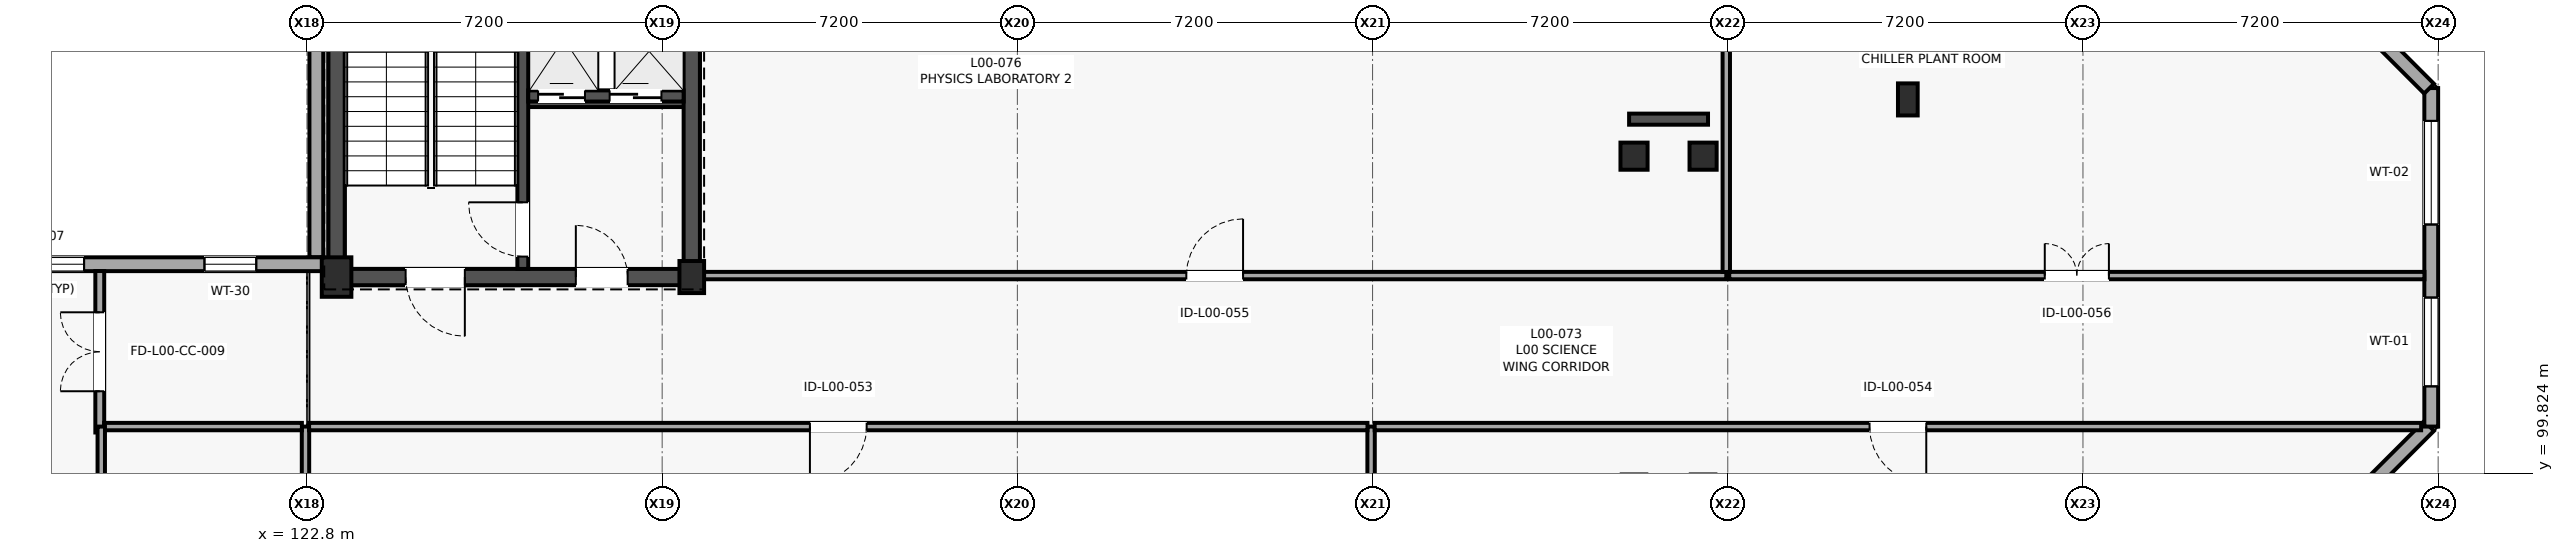
"""IFC4 building model, lengths in metres.
Left out: names, types, materials, properties, quantities, classifications, styles, units other than length and angle.
Written with IfcOpenShell. Run it as: python <this file> out.ifc"""

import sys

from ifc_helpers import new_model, si_unit, direction, frame, frame_2d, origin, origin_2d, place, context, subcontext, project, spatial, rectangle, extrude, element, fill, save


model = new_model("IFC4")
c1 = context("Model", 3, precision=1e-05, world=origin(), true_north=direction((0.0, 1.0)))
c2 = subcontext(c1, "Body", "Model", "MODEL_VIEW")
j1 = project(units=[si_unit("LENGTHUNIT", "METRE"), si_unit("PLANEANGLEUNIT", "RADIAN")], contexts=[c1])
p1 = place(None, origin())
s1 = spatial("IfcSite", under=j1, at=p1, CompositionType="ELEMENT")
p2 = place(p1, origin())
s2 = spatial("IfcBuilding", under=s1, at=p2, CompositionType="ELEMENT")
p3 = place(p2, origin())
s3 = spatial("IfcBuildingStorey", under=s2, at=p3, CompositionType="ELEMENT", Elevation=0.0)
p4 = place(p3, frame((126.955, 107.41, -1.55), z_axis=(0.0, 0.0, 1.0), x_axis=(1.0, 0.0, 0.0)))
e1 = element("IfcWall", 1, at=p4, inside=s3, PredefinedType="SHEAR", context=c2, shape_type="SweptSolid", body=[
    extrude(rectangle(XDim=3.81, YDim=0.33, at=frame_2d((1.905, 0.0))), origin(), (0.0, 0.0, 1.0), 1.3),
])
for number, where, z_axis, x_axis in (
    (2, (127.12, 107.575, -1.55), (0.0, 0.0, 1.0), (0.0, 1.0, 0.0)),
    (3, (130.6, 107.575, -1.55), (0.0, 0.0, 1.0), (0.0, 1.0, 0.0)),
):
    element("IfcWall", number, at=place(p3, frame(where, z_axis=z_axis, x_axis=x_axis)), inside=s3, PredefinedType="SHEAR", context=c2, shape_type="SweptSolid", body=[
        extrude(rectangle(XDim=3.86, YDim=0.33, at=frame_2d((1.93, 0.0))), origin(), (0.0, 0.0, 1.0), 1.3),
    ])
p5 = place(p3, frame((123.4, 103.965, -1.85), z_axis=(0.0, 0.0, 1.0), x_axis=(0.0, 1.0, 0.0)))
e4 = element("IfcWall", 4, at=p5, inside=s3, PredefinedType="SHEAR", context=c2, shape_type="SweptSolid", body=[
    extrude(rectangle(XDim=7.47, YDim=0.33, at=frame_2d((3.735, 0.0))), origin(), (0.0, 0.0, 1.0), 1.6),
])
p6 = place(p3, frame((123.235, 103.8, -1.85), z_axis=(0.0, 0.0, 1.0), x_axis=(1.0, 0.0, 0.0)))
e5 = element("IfcWall", 5, at=p6, inside=s3, PredefinedType="SHEAR", context=c2, shape_type="SweptSolid", body=[
    extrude(rectangle(XDim=3.865, YDim=0.33, at=frame_2d((1.933, 0.0))), origin(), (0.0, 0.0, 1.0), 1.6),
])
p7 = place(p3, frame((123.4, 103.8, 0.0), z_axis=(0.0, 0.0, 1.0), x_axis=(1.0, 0.0, 0.0)))
e6 = element("IfcColumn", 6, at=p7, inside=s3, PredefinedType="COLUMN", context=c2, shape_type="SweptSolid", body=[
    extrude(rectangle(XDim=0.6, YDim=0.8, at=origin_2d()), origin(), (0.0, 0.0, 1.0), 4.2),
])
p8 = place(p3, frame((130.6, 103.8, 0.0), z_axis=(0.0, 0.0, 1.0), x_axis=(1.0, 0.0, 0.0)))
e7 = element("IfcColumn", 7, at=p8, inside=s3, PredefinedType="COLUMN", context=c2, shape_type="SweptSolid", body=[
    extrude(rectangle(XDim=0.5, YDim=0.65, at=origin_2d()), origin(), (0.0, 0.0, 1.0), 4.2),
])
for number, where, z_axis, x_axis in (
    (8, (149.7, 106.25, 0.0), (0.0, 0.0, 1.0), (1.0, 0.0, 0.0)),
    (9, (151.1, 106.25, 0.0), (0.0, 0.0, 1.0), (1.0, 0.0, 0.0)),
):
    element("IfcColumn", number, at=place(p3, frame(where, z_axis=z_axis, x_axis=x_axis)), inside=s3, PredefinedType="COLUMN", context=c2, shape_type="SweptSolid", body=[
        extrude(rectangle(XDim=0.55, YDim=0.55, at=origin_2d()), origin(), (0.0, 0.0, 1.0), 4.2),
    ])
p9 = place(p3, frame((155.25, 107.4, 0.0), z_axis=(0.0, 0.0, 1.0), x_axis=(1.0, 0.0, 0.0)))
e10 = element("IfcColumn", 10, at=p9, inside=s3, PredefinedType="COLUMN", context=c2, shape_type="SweptSolid", body=[
    extrude(rectangle(XDim=0.4, YDim=0.65, at=origin_2d()), origin(), (0.0, 0.0, 1.0), 4.2),
])
p10 = place(p3, frame((161.618, 96.584, 0.0), z_axis=(0.0, 0.0, 1.0), x_axis=(0.707106781187, 0.707106781187, 0.0)))
e11 = element("IfcWall", 11, at=p10, inside=s3, PredefinedType="SOLIDWALL", context=c2, shape_type="SweptSolid", body=[
    extrude(rectangle(XDim=5.937, YDim=0.28, at=frame_2d((2.968, 0.0))), origin(), (0.0, 0.0, 1.0), 3.98),
])
p11 = place(p3, frame((165.86, 100.77, 0.0), z_axis=(0.0, 0.0, 1.0), x_axis=(0.0, 1.0, 0.0)))
e12 = element("IfcWall", 12, at=p11, inside=s3, PredefinedType="SOLIDWALL", context=c2, shape_type="SweptSolid", body=[
    extrude(rectangle(XDim=6.86, YDim=0.28, at=frame_2d((3.43, 0.0))), origin(), (0.0, 0.0, 1.0), 3.98),
])
p12 = place(p11, frame((0.815, 0.0, 0.85)))
e13 = element("IfcOpeningElement", 13, at=p12, cuts=e12, PredefinedType="OPENING", context=c2, shape_type="SweptSolid", body=[
    extrude(rectangle(XDim=1.8, YDim=1.8, at=frame_2d((0.9, 0.9))), frame((0.0, 0.15, 0.0), z_axis=(0.0, -1.0, 0.0), x_axis=(1.0, 0.0, 0.0)), (0.0, 0.0, 1.0), 0.3),
])
p13 = place(p11, frame((4.095, 0.0, 0.85)))
e14 = element("IfcOpeningElement", 14, at=p13, cuts=e12, PredefinedType="OPENING", context=c2, shape_type="SweptSolid", body=[
    extrude(rectangle(XDim=2.1, YDim=1.8, at=frame_2d((1.05, 0.9))), frame((0.0, 0.15, 0.0), z_axis=(0.0, -1.0, 0.0), x_axis=(1.0, 0.0, 0.0)), (0.0, 0.0, 1.0), 0.3),
])
p14 = place(p3, frame((165.816, 107.618, 0.0), z_axis=(0.0, 0.0, 1.0), x_axis=(-0.707106781187, 0.707106781187, 0.0)))
e15 = element("IfcWall", 15, at=p14, inside=s3, PredefinedType="SOLIDWALL", context=c2, shape_type="SweptSolid", body=[
    extrude(rectangle(XDim=5.937, YDim=0.28, at=frame_2d((2.968, 0.0))), origin(), (0.0, 0.0, 1.0), 3.98),
])
p15 = place(p3, frame((122.99, 111.72, 0.0), z_axis=(0.0, 0.0, 1.0), x_axis=(0.0, -1.0, 0.0)))
e16 = element("IfcWall", 16, at=p15, inside=s3, PredefinedType="SOLIDWALL", context=c2, shape_type="SweptSolid", body=[
    extrude(rectangle(XDim=7.52, YDim=0.28, at=frame_2d((3.76, 0.0))), origin(), (0.0, 0.0, 1.0), 3.98),
])
p16 = place(p3, frame((123.13, 104.06, 0.0), z_axis=(0.0, 0.0, 1.0), x_axis=(-1.0, 0.0, 0.0)))
e17 = element("IfcWall", 17, at=p16, inside=s3, PredefinedType="SOLIDWALL", context=c2, shape_type="SweptSolid", body=[
    extrude(rectangle(XDim=7.53, YDim=0.28, at=frame_2d((3.765, 0.0))), origin(), (0.0, 0.0, 1.0), 3.98),
])
p17 = place(p16, frame((1.358, 0.0, 1.05)))
e18 = element("IfcOpeningElement", 18, at=p17, cuts=e17, PredefinedType="OPENING", context=c2, shape_type="SweptSolid", body=[
    extrude(rectangle(XDim=1.05, YDim=1.3, at=frame_2d((0.525, 0.65))), frame((0.0, 0.15, 0.0), z_axis=(0.0, -1.0, 0.0), x_axis=(1.0, 0.0, 0.0)), (0.0, 0.0, 1.0), 0.3),
])
p18 = place(p16, frame((4.848, 0.0, 1.05)))
e19 = element("IfcOpeningElement", 19, at=p18, cuts=e17, PredefinedType="OPENING", context=c2, shape_type="SweptSolid", body=[
    extrude(rectangle(XDim=1.6, YDim=1.35, at=frame_2d((0.8, 0.675))), frame((0.0, 0.15, 0.0), z_axis=(0.0, -1.0, 0.0), x_axis=(1.0, 0.0, 0.0)), (0.0, 0.0, 1.0), 0.3),
])
p19 = place(p3, frame((123.235, 103.8, 0.0), z_axis=(0.0, 0.0, 1.0), x_axis=(1.0, 0.0, 0.0)))
e20 = element("IfcWall", 20, at=p19, inside=s3, PredefinedType="SHEAR", context=c2, shape_type="SweptSolid", body=[
    extrude(rectangle(XDim=7.53, YDim=0.33, at=frame_2d((3.765, 0.0))), origin(), (0.0, 0.0, 1.0), 3.98),
])
p20 = place(p19, frame((5.015, 0.0, 0.0)))
e21 = element("IfcOpeningElement", 21, at=p20, cuts=e20, PredefinedType="OPENING", context=c2, shape_type="SweptSolid", body=[
    extrude(rectangle(XDim=1.05, YDim=2.15, at=frame_2d((0.525, 1.075))), frame((0.0, 0.175, 0.0), z_axis=(0.0, -1.0, 0.0), x_axis=(1.0, 0.0, 0.0)), (0.0, 0.0, 1.0), 0.35),
])
p21 = place(p19, frame((1.565, 0.0, 0.0)))
e22 = element("IfcOpeningElement", 22, at=p21, cuts=e20, PredefinedType="OPENING", context=c2, shape_type="SweptSolid", body=[
    extrude(rectangle(XDim=1.2, YDim=2.2, at=frame_2d((0.6, 1.1))), frame((0.0, 0.175, 0.0), z_axis=(0.0, -1.0, 0.0), x_axis=(1.0, 0.0, 0.0)), (0.0, 0.0, 1.0), 0.35),
])
for number, where, z_axis, x_axis in (
    (23, (123.4, 103.965, 0.0), (0.0, 0.0, 1.0), (0.0, 1.0, 0.0)),
    (24, (130.6, 103.965, 0.0), (0.0, 0.0, 1.0), (0.0, 1.0, 0.0)),
):
    element("IfcWall", number, at=place(p3, frame(where, z_axis=z_axis, x_axis=x_axis)), inside=s3, PredefinedType="SHEAR", context=c2, shape_type="SweptSolid", body=[
        extrude(rectangle(XDim=7.47, YDim=0.33, at=frame_2d((3.735, 0.0))), origin(), (0.0, 0.0, 1.0), 3.98),
    ])
p22 = place(p3, frame((127.175, 103.965, 0.0), z_axis=(0.0, 0.0, 1.0), x_axis=(0.0, 1.0, 0.0)))
e25 = element("IfcWall", 25, at=p22, inside=s3, PredefinedType="SHEAR", context=c2, shape_type="SweptSolid", body=[
    extrude(rectangle(XDim=7.47, YDim=0.22, at=frame_2d((3.735, 0.0))), origin(), (0.0, 0.0, 1.0), 3.98),
])
p23 = place(p22, frame((0.25, 0.0, 0.0)))
e26 = element("IfcOpeningElement", 26, at=p23, cuts=e25, PredefinedType="OPENING", context=c2, shape_type="SweptSolid", body=[
    extrude(rectangle(XDim=1.1, YDim=2.15, at=frame_2d((0.55, 1.075))), frame((0.0, 0.12, 0.0), z_axis=(0.0, -1.0, 0.0), x_axis=(1.0, 0.0, 0.0)), (0.0, 0.0, 1.0), 0.24),
])
p24 = place(p3, frame((127.285, 107.47, 0.0), z_axis=(0.0, 0.0, 1.0), x_axis=(1.0, 0.0, 0.0)))
e27 = element("IfcWall", 27, at=p24, inside=s3, PredefinedType="SHEAR", context=c2, shape_type="SweptSolid", body=[
    extrude(rectangle(XDim=3.15, YDim=0.225, at=frame_2d((1.575, 0.0))), origin(), (0.0, 0.0, 1.0), 3.98),
])
p25 = place(p24, frame((0.2, 0.0, 0.0)))
e28 = element("IfcOpeningElement", 28, at=p25, cuts=e27, PredefinedType="OPENING", context=c2, shape_type="SweptSolid", body=[
    extrude(rectangle(XDim=0.95, YDim=2.15, at=frame_2d((0.475, 1.075))), frame((0.0, 0.123, 0.0), z_axis=(0.0, -1.0, 0.0), x_axis=(1.0, 0.0, 0.0)), (0.0, 0.0, 1.0), 0.245),
])
p26 = place(p24, frame((1.65, 0.0, 0.0)))
e29 = element("IfcOpeningElement", 29, at=p26, cuts=e27, PredefinedType="OPENING", context=c2, shape_type="SweptSolid", body=[
    extrude(rectangle(XDim=1.05, YDim=2.2, at=frame_2d((0.525, 1.1))), frame((0.0, 0.123, 0.0), z_axis=(0.0, -1.0, 0.0), x_axis=(1.0, 0.0, 0.0)), (0.0, 0.0, 1.0), 0.245),
])
p27 = place(p3, frame((149.6, 107.0, 0.0), z_axis=(0.0, 0.0, 1.0), x_axis=(1.0, 0.0, 0.0)))
e30 = element("IfcWall", 30, at=p27, inside=s3, PredefinedType="SHEAR", context=c2, shape_type="SweptSolid", body=[
    extrude(rectangle(XDim=1.6, YDim=0.225, at=frame_2d((0.8, 0.0))), origin(), (0.0, 0.0, 1.0), 3.92),
])
p28 = place(p3, frame((118.6, 100.65, 0.0), z_axis=(0.0, 0.0, 1.0), x_axis=(0.0, 1.0, 0.0)))
e31 = element("IfcWall", 31, at=p28, inside=s3, PredefinedType="PARTITIONING", context=c2, shape_type="SweptSolid", body=[
    extrude(rectangle(XDim=3.272, YDim=0.18, at=frame_2d((1.636, 0.0))), origin(), (0.0, 0.0, 1.0), 3.98),
])
p29 = place(p28, frame((0.836, 0.0, 0.0)))
e32 = element("IfcOpeningElement", 32, at=p29, cuts=e31, PredefinedType="OPENING", context=c2, shape_type="SweptSolid", body=[
    extrude(rectangle(XDim=1.6, YDim=2.25, at=frame_2d((0.8, 1.125))), frame((0.0, 0.1, 0.0), z_axis=(0.0, -1.0, 0.0), x_axis=(1.0, 0.0, 0.0)), (0.0, 0.0, 1.0), 0.2),
])
p30 = place(p3, frame((122.77, 96.678, 0.0), z_axis=(0.0, 0.0, 1.0), x_axis=(0.0, 1.0, 0.0)))
e33 = element("IfcWall", 33, at=p30, inside=s3, PredefinedType="PARTITIONING", context=c2, shape_type="SweptSolid", body=[
    extrude(rectangle(XDim=4.092, YDim=0.15, at=frame_2d((2.046, 0.0))), origin(), (0.0, 0.0, 1.0), 3.915),
])
p31 = place(p3, frame((122.697, 100.77, 0.0), z_axis=(0.0, 0.0, 1.0), x_axis=(-1.0, 0.0, 0.0)))
e34 = element("IfcWall", 34, at=p31, inside=s3, PredefinedType="PARTITIONING", context=c2, shape_type="SweptSolid", body=[
    extrude(rectangle(XDim=4.009, YDim=0.15, at=frame_2d((2.004, 0.0))), origin(), (0.0, 0.0, 1.0), 3.915),
])
p32 = place(p3, frame((118.63, 100.77, 0.0), z_axis=(0.0, 0.0, 1.0), x_axis=(0.0, -1.0, 0.0)))
e35 = element("IfcWall", 35, at=p32, inside=s3, PredefinedType="PARTITIONING", context=c2, shape_type="SweptSolid", body=[
    extrude(rectangle(XDim=10.922, YDim=0.15, at=frame_2d((5.461, 0.0))), origin(), (0.0, 0.0, 1.0), 3.315),
])
p33 = place(p32, frame((4.886, 0.0, 0.0)))
e36 = element("IfcOpeningElement", 36, at=p33, cuts=e35, PredefinedType="OPENING", context=c2, shape_type="SweptSolid", body=[
    extrude(rectangle(XDim=1.15, YDim=2.2, at=frame_2d((0.575, 1.1))), frame((0.0, 0.085, 0.0), z_axis=(0.0, -1.0, 0.0), x_axis=(1.0, 0.0, 0.0)), (0.0, 0.0, 1.0), 0.17),
])
p34 = place(p3, frame((144.37, 96.678, 0.0), z_axis=(0.0, 0.0, 1.0), x_axis=(0.0, 1.0, 0.0)))
e37 = element("IfcWall", 37, at=p34, inside=s3, PredefinedType="PARTITIONING", context=c2, shape_type="SweptSolid", body=[
    extrude(rectangle(XDim=4.092, YDim=0.15, at=frame_2d((2.046, 0.0))), origin(), (0.0, 0.0, 1.0), 3.365),
])
p35 = place(p3, frame((144.297, 100.77, 0.0), z_axis=(0.0, 0.0, 1.0), x_axis=(-1.0, 0.0, 0.0)))
e38 = element("IfcWall", 38, at=p35, inside=s3, PredefinedType="PARTITIONING", context=c2, shape_type="SweptSolid", body=[
    extrude(rectangle(XDim=21.454, YDim=0.15, at=frame_2d((10.727, 0.0))), origin(), (0.0, 0.0, 1.0), 3.915),
])
p36 = place(p35, frame((10.152, 0.0, 0.0)))
e39 = element("IfcOpeningElement", 39, at=p36, cuts=e38, PredefinedType="OPENING", context=c2, shape_type="SweptSolid", body=[
    extrude(rectangle(XDim=1.15, YDim=2.2, at=frame_2d((0.575, 1.1))), frame((0.0, 0.085, 0.0), z_axis=(0.0, -1.0, 0.0), x_axis=(1.0, 0.0, 0.0)), (0.0, 0.0, 1.0), 0.17),
])
p37 = place(p3, frame((165.655, 100.77, 0.0), z_axis=(0.0, 0.0, 1.0), x_axis=(-1.0, 0.0, 0.0)))
e40 = element("IfcWall", 40, at=p37, inside=s3, PredefinedType="PARTITIONING", context=c2, shape_type="SweptSolid", body=[
    extrude(rectangle(XDim=21.212, YDim=0.15, at=frame_2d((10.606, 0.0))), origin(), (0.0, 0.0, 1.0), 3.915),
])
p38 = place(p37, frame((10.031, 0.0, 0.0)))
e41 = element("IfcOpeningElement", 41, at=p38, cuts=e40, PredefinedType="OPENING", context=c2, shape_type="SweptSolid", body=[
    extrude(rectangle(XDim=1.15, YDim=2.2, at=frame_2d((0.575, 1.1))), frame((0.0, 0.085, 0.0), z_axis=(0.0, -1.0, 0.0), x_axis=(1.0, 0.0, 0.0)), (0.0, 0.0, 1.0), 0.17),
])
p39 = place(p3, frame((130.83, 103.83, 0.0), z_axis=(0.0, 0.0, 1.0), x_axis=(1.0, 0.0, 0.0)))
e42 = element("IfcWall", 42, at=p39, inside=s3, PredefinedType="PARTITIONING", context=c2, shape_type="SweptSolid", body=[
    extrude(rectangle(XDim=20.74, YDim=0.15, at=frame_2d((10.37, 0.0))), origin(), (0.0, 0.0, 1.0), 3.915),
])
p40 = place(p39, frame((9.795, 0.0, 0.0)))
e43 = element("IfcOpeningElement", 43, at=p40, cuts=e42, PredefinedType="OPENING", context=c2, shape_type="SweptSolid", body=[
    extrude(rectangle(XDim=1.15, YDim=2.2, at=frame_2d((0.575, 1.1))), frame((0.0, 0.085, 0.0), z_axis=(0.0, -1.0, 0.0), x_axis=(1.0, 0.0, 0.0)), (0.0, 0.0, 1.0), 0.17),
])
p41 = place(p3, frame((151.57, 103.903, 0.0), z_axis=(0.0, 0.0, 1.0), x_axis=(0.0, 1.0, 0.0)))
e44 = element("IfcWall", 44, at=p41, inside=s3, PredefinedType="PARTITIONING", context=c2, shape_type="SweptSolid", body=[
    extrude(rectangle(XDim=7.819, YDim=0.15, at=frame_2d((3.909, 0.0))), origin(), (0.0, 0.0, 1.0), 3.315),
])
p42 = place(p3, frame((151.63, 103.83, 0.0), z_axis=(0.0, 0.0, 1.0), x_axis=(1.0, 0.0, 0.0)))
e45 = element("IfcWall", 45, at=p42, inside=s3, PredefinedType="PARTITIONING", context=c2, shape_type="SweptSolid", body=[
    extrude(rectangle(XDim=14.092, YDim=0.15, at=frame_2d((7.046, 0.0))), origin(), (0.0, 0.0, 1.0), 3.915),
])
p43 = place(p42, frame((6.396, 0.0, 0.0)))
e46 = element("IfcOpeningElement", 46, at=p43, cuts=e45, PredefinedType="OPENING", context=c2, shape_type="SweptSolid", body=[
    extrude(rectangle(XDim=1.3, YDim=2.15, at=frame_2d((0.65, 1.075))), frame((0.0, 0.085, 0.0), z_axis=(0.0, -1.0, 0.0), x_axis=(1.0, 0.0, 0.0)), (0.0, 0.0, 1.0), 0.17),
])
p44 = place(p12, origin())
e47 = element("IfcWindow", 47, at=p44, inside=s3, PartitioningType="SINGLE_PANEL", PredefinedType="WINDOW", context=c2, shape_type="SweptSolid", body=[
    extrude(rectangle(XDim=1.8, YDim=1.8, at=frame_2d((0.9, 0.9))), frame((0.0, 0.03, 0.0), z_axis=(0.0, -1.0, 0.0), x_axis=(1.0, 0.0, 0.0)), (0.0, 0.0, 1.0), 0.06),
])
fill(e13, e47)
p45 = place(p13, origin())
e48 = element("IfcWindow", 48, at=p45, inside=s3, PartitioningType="SINGLE_PANEL", PredefinedType="WINDOW", context=c2, shape_type="SweptSolid", body=[
    extrude(rectangle(XDim=2.1, YDim=1.8, at=frame_2d((1.05, 0.9))), frame((0.0, 0.03, 0.0), z_axis=(0.0, -1.0, 0.0), x_axis=(1.0, 0.0, 0.0)), (0.0, 0.0, 1.0), 0.06),
])
fill(e14, e48)
p46 = place(p17, origin())
e49 = element("IfcWindow", 49, at=p46, inside=s3, PartitioningType="SINGLE_PANEL", PredefinedType="WINDOW", context=c2, shape_type="SweptSolid", body=[
    extrude(rectangle(XDim=1.05, YDim=1.3, at=frame_2d((0.525, 0.65))), frame((0.0, 0.03, 0.0), z_axis=(0.0, -1.0, 0.0), x_axis=(1.0, 0.0, 0.0)), (0.0, 0.0, 1.0), 0.06),
])
fill(e18, e49)
p47 = place(p18, origin())
e50 = element("IfcWindow", 50, at=p47, inside=s3, PartitioningType="SINGLE_PANEL", PredefinedType="WINDOW", context=c2, shape_type="SweptSolid", body=[
    extrude(rectangle(XDim=1.6, YDim=1.35, at=frame_2d((0.8, 0.675))), frame((0.0, 0.03, 0.0), z_axis=(0.0, -1.0, 0.0), x_axis=(1.0, 0.0, 0.0)), (0.0, 0.0, 1.0), 0.06),
])
fill(e19, e50)
p48 = place(p25, origin())
e51 = element("IfcDoor", 51, at=p48, inside=s3, OperationType="SLIDING_TO_LEFT", PredefinedType="DOOR", context=c2, shape_type="SweptSolid", body=[
    extrude(rectangle(XDim=0.95, YDim=2.15, at=frame_2d((0.475, 1.075))), frame((0.0, 0.025, 0.0), z_axis=(0.0, -1.0, 0.0), x_axis=(1.0, 0.0, 0.0)), (0.0, 0.0, 1.0), 0.05),
])
fill(e28, e51)
p49 = place(p26, origin())
e52 = element("IfcDoor", 52, at=p49, inside=s3, OperationType="SLIDING_TO_RIGHT", PredefinedType="DOOR", context=c2, shape_type="SweptSolid", body=[
    extrude(rectangle(XDim=1.05, YDim=2.2, at=frame_2d((0.525, 1.1))), frame((0.0, 0.025, 0.0), z_axis=(0.0, -1.0, 0.0), x_axis=(1.0, 0.0, 0.0)), (0.0, 0.0, 1.0), 0.05),
])
fill(e29, e52)
p50 = place(p23, origin())
e53 = element("IfcDoor", 53, at=p50, inside=s3, OperationType="SINGLE_SWING_RIGHT", PredefinedType="DOOR", context=c2, shape_type="SweptSolid", body=[
    extrude(rectangle(XDim=1.1, YDim=2.15, at=frame_2d((0.55, 1.075))), frame((0.0, 0.025, 0.0), z_axis=(0.0, -1.0, 0.0), x_axis=(1.0, 0.0, 0.0)), (0.0, 0.0, 1.0), 0.05),
])
fill(e26, e53)
p51 = place(p20, origin())
e54 = element("IfcDoor", 54, at=p51, inside=s3, OperationType="SINGLE_SWING_LEFT", PredefinedType="DOOR", context=c2, shape_type="SweptSolid", body=[
    extrude(rectangle(XDim=1.05, YDim=2.15, at=frame_2d((0.525, 1.075))), frame((0.0, 0.025, 0.0), z_axis=(0.0, -1.0, 0.0), x_axis=(1.0, 0.0, 0.0)), (0.0, 0.0, 1.0), 0.05),
])
fill(e21, e54)
p52 = place(p21, frame((1.2, 0.0, 0.0), z_axis=(0.0, 0.0, 1.0), x_axis=(-1.0, 0.0, 0.0)))
e55 = element("IfcDoor", 55, at=p52, inside=s3, OperationType="SINGLE_SWING_RIGHT", PredefinedType="DOOR", context=c2, shape_type="SweptSolid", body=[
    extrude(rectangle(XDim=1.2, YDim=2.2, at=frame_2d((0.6, 1.1))), frame((0.0, 0.025, 0.0), z_axis=(0.0, -1.0, 0.0), x_axis=(1.0, 0.0, 0.0)), (0.0, 0.0, 1.0), 0.05),
])
fill(e22, e55)
p53 = place(p29, origin())
e56 = element("IfcDoor", 56, at=p53, inside=s3, OperationType="DOUBLE_DOOR_SINGLE_SWING", PredefinedType="DOOR", context=c2, shape_type="SweptSolid", body=[
    extrude(rectangle(XDim=1.6, YDim=2.25, at=frame_2d((0.8, 1.125))), frame((0.0, 0.025, 0.0), z_axis=(0.0, -1.0, 0.0), x_axis=(1.0, 0.0, 0.0)), (0.0, 0.0, 1.0), 0.05),
])
fill(e32, e56)
p54 = place(p36, origin())
e57 = element("IfcDoor", 57, at=p54, inside=s3, OperationType="SINGLE_SWING_RIGHT", PredefinedType="DOOR", context=c2, shape_type="SweptSolid", body=[
    extrude(rectangle(XDim=1.15, YDim=2.2, at=frame_2d((0.575, 1.1))), frame((0.0, 0.025, 0.0), z_axis=(0.0, -1.0, 0.0), x_axis=(1.0, 0.0, 0.0)), (0.0, 0.0, 1.0), 0.05),
])
fill(e39, e57)
p55 = place(p38, origin())
e58 = element("IfcDoor", 58, at=p55, inside=s3, OperationType="SINGLE_SWING_LEFT", PredefinedType="DOOR", context=c2, shape_type="SweptSolid", body=[
    extrude(rectangle(XDim=1.15, YDim=2.2, at=frame_2d((0.575, 1.1))), frame((0.0, 0.025, 0.0), z_axis=(0.0, -1.0, 0.0), x_axis=(1.0, 0.0, 0.0)), (0.0, 0.0, 1.0), 0.05),
])
fill(e41, e58)
p56 = place(p40, origin())
e59 = element("IfcDoor", 59, at=p56, inside=s3, OperationType="SINGLE_SWING_RIGHT", PredefinedType="DOOR", context=c2, shape_type="SweptSolid", body=[
    extrude(rectangle(XDim=1.15, YDim=2.2, at=frame_2d((0.575, 1.1))), frame((0.0, 0.025, 0.0), z_axis=(0.0, -1.0, 0.0), x_axis=(1.0, 0.0, 0.0)), (0.0, 0.0, 1.0), 0.05),
])
fill(e43, e59)
p57 = place(p43, origin())
e60 = element("IfcDoor", 60, at=p57, inside=s3, OperationType="DOUBLE_DOOR_SINGLE_SWING", PredefinedType="DOOR", context=c2, shape_type="SweptSolid", body=[
    extrude(rectangle(XDim=1.3, YDim=2.15, at=frame_2d((0.65, 1.075))), frame((0.0, 0.025, 0.0), z_axis=(0.0, -1.0, 0.0), x_axis=(1.0, 0.0, 0.0)), (0.0, 0.0, 1.0), 0.05),
])
fill(e46, e60)
save(model, sys.argv[1])
